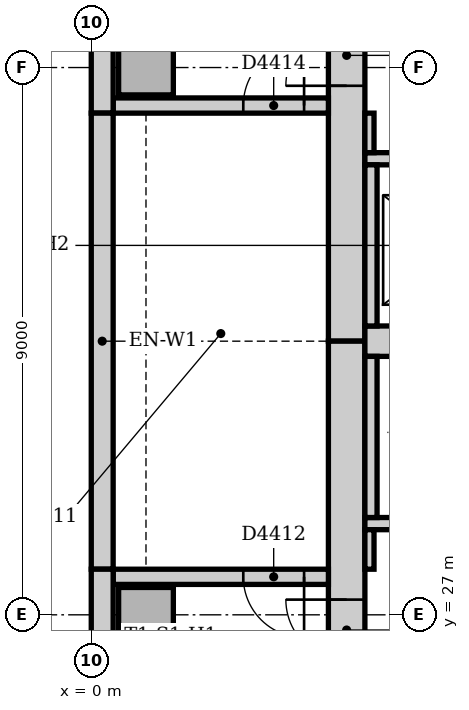
"""IFC4 building model, lengths in metres.
Left out: names, types, materials, properties, quantities, classifications, styles, units other than length and angle.
Written with IfcOpenShell. Run it as: python <this file> out.ifc"""

import sys

from ifc_helpers import new_model, si_unit, direction, frame, frame_2d, origin, origin_2d, place, context, subcontext, project, spatial, rectangle, extrude, element, fill, save


model = new_model("IFC4")
c1 = context("Model", 3, precision=1e-05, world=origin(), true_north=direction((0.0, 1.0)))
c2 = subcontext(c1, "Body", "Model", "MODEL_VIEW")
j1 = project(units=[si_unit("LENGTHUNIT", "METRE"), si_unit("PLANEANGLEUNIT", "RADIAN")], contexts=[c1])
p1 = place(None, origin())
s1 = spatial("IfcSite", under=j1, at=p1, CompositionType="ELEMENT")
p2 = place(p1, origin())
s2 = spatial("IfcBuilding", under=s1, at=p2, CompositionType="ELEMENT")
p3 = place(p2, frame((0.0, 0.0, 149.0)))
s3 = spatial("IfcBuildingStorey", under=s2, at=p3, CompositionType="ELEMENT", Elevation=149.0)
p4 = place(p3, frame((4.2, 42.0, 0.0), z_axis=(0.0, 0.0, 1.0), x_axis=(0.0, -1.0, 0.0)))
e1 = element("IfcWall", 1, at=p4, inside=s3, PredefinedType="SOLIDWALL", context=c2, shape_type="SweptSolid", body=[
    extrude(rectangle(XDim=10.5, YDim=0.6, at=frame_2d((5.25, 0.0))), origin(), (0.0, 0.0, 1.0), 4.0),
])
p5 = place(p4, frame((5.3, 0.0, 0.0)))
e2 = element("IfcOpeningElement", 2, at=p5, cuts=e1, PredefinedType="OPENING", context=c2, shape_type="SweptSolid", body=[
    extrude(rectangle(XDim=1.0, YDim=2.1, at=frame_2d((0.5, 1.05))), frame((0.0, 0.31, 0.0), z_axis=(0.0, -1.0, 0.0), x_axis=(1.0, 0.0, 0.0)), (0.0, 0.0, 1.0), 0.62),
])
p6 = place(p3, frame((4.2, 31.5, 0.0), z_axis=(0.0, 0.0, 1.0), x_axis=(0.0, -1.0, 0.0)))
e3 = element("IfcWall", 3, at=p6, inside=s3, PredefinedType="SOLIDWALL", context=c2, shape_type="SweptSolid", body=[
    extrude(rectangle(XDim=10.5, YDim=0.6, at=frame_2d((5.25, 0.0))), origin(), (0.0, 0.0, 1.0), 4.0),
])
p7 = place(p6, frame((4.25, 0.0, 0.0)))
e4 = element("IfcOpeningElement", 4, at=p7, cuts=e3, PredefinedType="OPENING", context=c2, shape_type="SweptSolid", body=[
    extrude(rectangle(XDim=1.0, YDim=2.1, at=frame_2d((0.5, 1.05))), frame((0.0, 0.31, 0.0), z_axis=(0.0, -1.0, 0.0), x_axis=(1.0, 0.0, 0.0)), (0.0, 0.0, 1.0), 0.62),
])
p8 = place(p3, frame((4.5, 31.5, 0.0), z_axis=(0.0, 0.0, 1.0), x_axis=(1.0, 0.0, 0.0)))
e5 = element("IfcWall", 5, at=p8, inside=s3, PredefinedType="SOLIDWALL", context=c2, shape_type="SweptSolid", body=[
    extrude(rectangle(XDim=18.0, YDim=0.5, at=frame_2d((9.0, 0.0))), origin(), (0.0, 0.0, 1.0), 4.0),
])
p9 = place(p3, frame((3.9, 27.625, 0.0), z_axis=(0.0, 0.0, 1.0), x_axis=(-1.0, 0.0, 0.0)))
e6 = element("IfcWall", 6, at=p9, inside=s3, PredefinedType="SOLIDWALL", context=c2, shape_type="SweptSolid", body=[
    extrude(rectangle(XDim=3.54, YDim=0.25, at=frame_2d((1.77, 0.0))), origin(), (0.0, 0.0, 1.0), 4.0),
])
p10 = place(p9, frame((0.4, 0.0, 0.0)))
e7 = element("IfcOpeningElement", 7, at=p10, cuts=e6, PredefinedType="OPENING", context=c2, shape_type="SweptSolid", body=[
    extrude(rectangle(XDim=1.0, YDim=2.1, at=frame_2d((0.5, 1.05))), frame((0.0, 0.135, 0.0), z_axis=(0.0, -1.0, 0.0), x_axis=(1.0, 0.0, 0.0)), (0.0, 0.0, 1.0), 0.27),
])
p11 = place(p3, frame((0.36, 35.375, 0.0), z_axis=(0.0, 0.0, 1.0), x_axis=(1.0, 0.0, 0.0)))
e8 = element("IfcWall", 8, at=p11, inside=s3, PredefinedType="SOLIDWALL", context=c2, shape_type="SweptSolid", body=[
    extrude(rectangle(XDim=3.54, YDim=0.25, at=frame_2d((1.77, 0.0))), origin(), (0.0, 0.0, 1.0), 4.0),
])
p12 = place(p11, frame((2.14, 0.0, 0.0)))
e9 = element("IfcOpeningElement", 9, at=p12, cuts=e8, PredefinedType="OPENING", context=c2, shape_type="SweptSolid", body=[
    extrude(rectangle(XDim=1.0, YDim=2.1, at=frame_2d((0.5, 1.05))), frame((0.0, 0.135, 0.0), z_axis=(0.0, -1.0, 0.0), x_axis=(1.0, 0.0, 0.0)), (0.0, 0.0, 1.0), 0.27),
])
for number, where, z_axis, x_axis in (
    (10, (0.9, 27.0, 0.0), (0.0, 0.0, 1.0), (1.0, 0.0, 0.0)),
    (11, (0.9, 36.0, 0.0), (0.0, 0.0, 1.0), (1.0, 0.0, 0.0)),
):
    element("IfcColumn", number, at=place(p3, frame(where, z_axis=z_axis, x_axis=x_axis)), inside=s3, PredefinedType="COLUMN", context=c2, shape_type="SweptSolid", body=[
        extrude(rectangle(XDim=0.9, YDim=0.9, at=origin_2d()), origin(), (0.0, 0.0, 1.0), 4.0),
    ])
p13 = place(p3, frame((0.18, 42.0, 0.0), z_axis=(0.0, 0.0, 1.0), x_axis=(0.0, -1.0, 0.0)))
e12 = element("IfcWall", 12, at=p13, inside=s3, PredefinedType="STANDARD", context=c2, shape_type="SweptSolid", body=[
    extrude(rectangle(XDim=6.75, YDim=0.36, at=frame_2d((3.375, 0.0))), origin(), (0.0, 0.0, 1.0), 3.85),
])
p14 = place(p3, frame((0.18, 35.25, 0.0), z_axis=(0.0, 0.0, 1.0), x_axis=(0.0, -1.0, 0.0)))
e13 = element("IfcWall", 13, at=p14, inside=s3, PredefinedType="STANDARD", context=c2, shape_type="SweptSolid", body=[
    extrude(rectangle(XDim=7.5, YDim=0.36, at=frame_2d((3.75, 0.0))), origin(), (0.0, 0.0, 1.0), 3.85),
])
p15 = place(p3, frame((0.18, 27.75, 0.0), z_axis=(0.0, 0.0, 1.0), x_axis=(0.0, -1.0, 0.0)))
e14 = element("IfcWall", 14, at=p15, inside=s3, PredefinedType="STANDARD", context=c2, shape_type="SweptSolid", body=[
    extrude(rectangle(XDim=6.75, YDim=0.36, at=frame_2d((3.375, 0.0))), origin(), (0.0, 0.0, 1.0), 3.85),
])
p16 = place(p3, frame((4.5, 28.5, 0.0), z_axis=(0.0, 0.0, 1.0), x_axis=(1.0, 0.0, 0.0)))
e15 = element("IfcWall", 15, at=p16, inside=s3, PredefinedType="PARTITIONING", context=c2, shape_type="SweptSolid", body=[
    extrude(rectangle(XDim=18.0, YDim=0.2, at=frame_2d((9.0, 0.0))), origin(), (0.0, 0.0, 1.0), 3.85),
])
p17 = place(p16, frame((0.95, 0.0, 0.0)))
e16 = element("IfcOpeningElement", 16, at=p17, cuts=e15, PredefinedType="OPENING", context=c2, shape_type="SweptSolid", body=[
    extrude(rectangle(XDim=1.1, YDim=2.1, at=frame_2d((0.55, 1.05))), frame((0.0, 0.11, 0.0), z_axis=(0.0, -1.0, 0.0), x_axis=(1.0, 0.0, 0.0)), (0.0, 0.0, 1.0), 0.22),
])
p18 = place(p16, frame((3.95, 0.0, 0.0)))
e17 = element("IfcOpeningElement", 17, at=p18, cuts=e15, PredefinedType="OPENING", context=c2, shape_type="SweptSolid", body=[
    extrude(rectangle(XDim=1.1, YDim=2.1, at=frame_2d((0.55, 1.05))), frame((0.0, 0.11, 0.0), z_axis=(0.0, -1.0, 0.0), x_axis=(1.0, 0.0, 0.0)), (0.0, 0.0, 1.0), 0.22),
])
p19 = place(p16, frame((6.95, 0.0, 0.0)))
e18 = element("IfcOpeningElement", 18, at=p19, cuts=e15, PredefinedType="OPENING", context=c2, shape_type="SweptSolid", body=[
    extrude(rectangle(XDim=1.1, YDim=2.1, at=frame_2d((0.55, 1.05))), frame((0.0, 0.11, 0.0), z_axis=(0.0, -1.0, 0.0), x_axis=(1.0, 0.0, 0.0)), (0.0, 0.0, 1.0), 0.22),
])
p20 = place(p16, frame((9.95, 0.0, 0.0)))
e19 = element("IfcOpeningElement", 19, at=p20, cuts=e15, PredefinedType="OPENING", context=c2, shape_type="SweptSolid", body=[
    extrude(rectangle(XDim=1.1, YDim=2.1, at=frame_2d((0.55, 1.05))), frame((0.0, 0.11, 0.0), z_axis=(0.0, -1.0, 0.0), x_axis=(1.0, 0.0, 0.0)), (0.0, 0.0, 1.0), 0.22),
])
p21 = place(p16, frame((12.95, 0.0, 0.0)))
e20 = element("IfcOpeningElement", 20, at=p21, cuts=e15, PredefinedType="OPENING", context=c2, shape_type="SweptSolid", body=[
    extrude(rectangle(XDim=1.1, YDim=2.1, at=frame_2d((0.55, 1.05))), frame((0.0, 0.11, 0.0), z_axis=(0.0, -1.0, 0.0), x_axis=(1.0, 0.0, 0.0)), (0.0, 0.0, 1.0), 0.22),
])
p22 = place(p16, frame((15.95, 0.0, 0.0)))
e21 = element("IfcOpeningElement", 21, at=p22, cuts=e15, PredefinedType="OPENING", context=c2, shape_type="SweptSolid", body=[
    extrude(rectangle(XDim=1.1, YDim=2.1, at=frame_2d((0.55, 1.05))), frame((0.0, 0.11, 0.0), z_axis=(0.0, -1.0, 0.0), x_axis=(1.0, 0.0, 0.0)), (0.0, 0.0, 1.0), 0.22),
])
p23 = place(p3, frame((4.5, 34.5, 0.0), z_axis=(0.0, 0.0, 1.0), x_axis=(1.0, 0.0, 0.0)))
e22 = element("IfcWall", 22, at=p23, inside=s3, PredefinedType="PARTITIONING", context=c2, shape_type="SweptSolid", body=[
    extrude(rectangle(XDim=18.0, YDim=0.2, at=frame_2d((9.0, 0.0))), origin(), (0.0, 0.0, 1.0), 3.85),
])
p24 = place(p23, frame((0.95, 0.0, 0.0)))
e23 = element("IfcOpeningElement", 23, at=p24, cuts=e22, PredefinedType="OPENING", context=c2, shape_type="SweptSolid", body=[
    extrude(rectangle(XDim=1.1, YDim=2.1, at=frame_2d((0.55, 1.05))), frame((0.0, 0.11, 0.0), z_axis=(0.0, -1.0, 0.0), x_axis=(1.0, 0.0, 0.0)), (0.0, 0.0, 1.0), 0.22),
])
p25 = place(p23, frame((3.95, 0.0, 0.0)))
e24 = element("IfcOpeningElement", 24, at=p25, cuts=e22, PredefinedType="OPENING", context=c2, shape_type="SweptSolid", body=[
    extrude(rectangle(XDim=1.1, YDim=2.1, at=frame_2d((0.55, 1.05))), frame((0.0, 0.11, 0.0), z_axis=(0.0, -1.0, 0.0), x_axis=(1.0, 0.0, 0.0)), (0.0, 0.0, 1.0), 0.22),
])
p26 = place(p23, frame((12.95, 0.0, 0.0)))
e25 = element("IfcOpeningElement", 25, at=p26, cuts=e22, PredefinedType="OPENING", context=c2, shape_type="SweptSolid", body=[
    extrude(rectangle(XDim=1.1, YDim=2.1, at=frame_2d((0.55, 1.05))), frame((0.0, 0.11, 0.0), z_axis=(0.0, -1.0, 0.0), x_axis=(1.0, 0.0, 0.0)), (0.0, 0.0, 1.0), 0.22),
])
p27 = place(p23, frame((15.95, 0.0, 0.0)))
e26 = element("IfcOpeningElement", 26, at=p27, cuts=e22, PredefinedType="OPENING", context=c2, shape_type="SweptSolid", body=[
    extrude(rectangle(XDim=1.1, YDim=2.1, at=frame_2d((0.55, 1.05))), frame((0.0, 0.11, 0.0), z_axis=(0.0, -1.0, 0.0), x_axis=(1.0, 0.0, 0.0)), (0.0, 0.0, 1.0), 0.22),
])
for number, where, z_axis, x_axis in (
    (27, (4.6, 31.75, 0.0), (0.0, 0.0, 1.0), (0.0, 1.0, 0.0)),
    (28, (4.6, 28.6, 0.0), (0.0, 0.0, 1.0), (0.0, 1.0, 0.0)),
):
    element("IfcWall", number, at=place(p3, frame(where, z_axis=z_axis, x_axis=x_axis)), inside=s3, PredefinedType="PARTITIONING", context=c2, shape_type="SweptSolid", body=[
        extrude(rectangle(XDim=2.65, YDim=0.2, at=frame_2d((1.325, 0.0))), origin(), (0.0, 0.0, 1.0), 3.85),
    ])
for number, where, z_axis, x_axis in (
    (29, (4.575, 27.75, 0.0), (0.0, 0.0, 1.0), (0.0, 1.0, 0.0)),
    (30, (4.575, 34.6, 0.0), (0.0, 0.0, 1.0), (0.0, 1.0, 0.0)),
):
    element("IfcWall", number, at=place(p3, frame(where, z_axis=z_axis, x_axis=x_axis)), inside=s3, PredefinedType="PARTITIONING", context=c2, shape_type="SweptSolid", body=[
        extrude(rectangle(XDim=0.65, YDim=0.15, at=frame_2d((0.325, 0.0))), origin(), (0.0, 0.0, 1.0), 3.85),
    ])
p28 = place(p7, frame((1.0, 0.0, 0.0), z_axis=(0.0, 0.0, 1.0), x_axis=(-1.0, 0.0, 0.0)))
e31 = element("IfcDoor", 31, at=p28, inside=s3, OperationType="SINGLE_SWING_RIGHT", PredefinedType="DOOR", context=c2, shape_type="SweptSolid", body=[
    extrude(rectangle(XDim=1.0, YDim=2.1, at=frame_2d((0.5, 1.05))), frame((0.0, 0.025, 0.0), z_axis=(0.0, -1.0, 0.0), x_axis=(1.0, 0.0, 0.0)), (0.0, 0.0, 1.0), 0.05),
])
fill(e4, e31)
p29 = place(p10, origin())
e32 = element("IfcDoor", 32, at=p29, inside=s3, OperationType="SINGLE_SWING_LEFT", PredefinedType="DOOR", context=c2, shape_type="SweptSolid", body=[
    extrude(rectangle(XDim=1.0, YDim=2.1, at=frame_2d((0.5, 1.05))), frame((0.0, 0.025, 0.0), z_axis=(0.0, -1.0, 0.0), x_axis=(1.0, 0.0, 0.0)), (0.0, 0.0, 1.0), 0.05),
])
fill(e7, e32)
p30 = place(p5, frame((1.0, 0.0, 0.0), z_axis=(0.0, 0.0, 1.0), x_axis=(-1.0, 0.0, 0.0)))
e33 = element("IfcDoor", 33, at=p30, inside=s3, OperationType="SINGLE_SWING_LEFT", PredefinedType="DOOR", context=c2, shape_type="SweptSolid", body=[
    extrude(rectangle(XDim=1.0, YDim=2.1, at=frame_2d((0.5, 1.05))), frame((0.0, 0.025, 0.0), z_axis=(0.0, -1.0, 0.0), x_axis=(1.0, 0.0, 0.0)), (0.0, 0.0, 1.0), 0.05),
])
fill(e2, e33)
p31 = place(p12, origin())
e34 = element("IfcDoor", 34, at=p31, inside=s3, OperationType="SINGLE_SWING_RIGHT", PredefinedType="DOOR", context=c2, shape_type="SweptSolid", body=[
    extrude(rectangle(XDim=1.0, YDim=2.1, at=frame_2d((0.5, 1.05))), frame((0.0, 0.025, 0.0), z_axis=(0.0, -1.0, 0.0), x_axis=(1.0, 0.0, 0.0)), (0.0, 0.0, 1.0), 0.05),
])
fill(e9, e34)
save(model, sys.argv[1])
